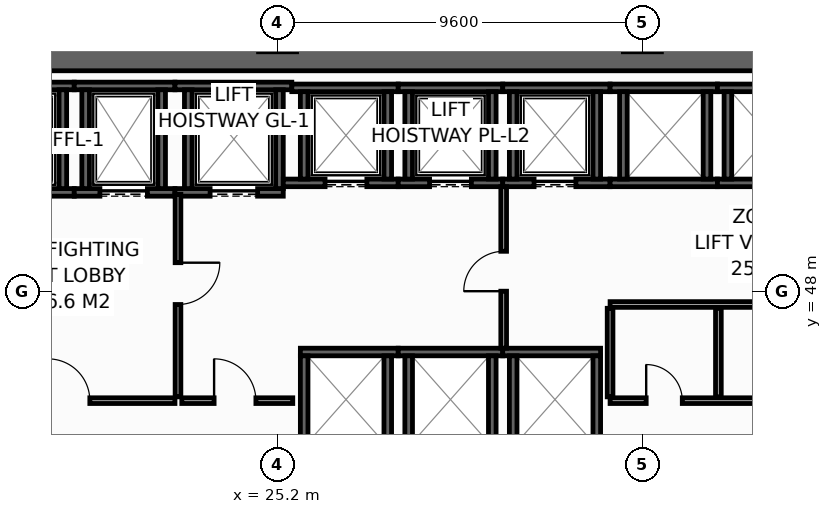
"""IFC4 building model, lengths in metres.
Left out: names, types, materials, properties, quantities, classifications, styles, units other than length and angle.
Written with IfcOpenShell. Run it as: python <this file> out.ifc"""

import sys

from ifc_helpers import new_model, si_unit, direction, frame, frame_2d, origin, place, context, subcontext, project, spatial, rectangle, extrude, element, fill, save


model = new_model("IFC4")
c1 = context("Model", 3, precision=1e-05, world=origin(), true_north=direction((0.0, 1.0)))
c2 = subcontext(c1, "Body", "Model", "MODEL_VIEW")
j1 = project(units=[si_unit("LENGTHUNIT", "METRE"), si_unit("PLANEANGLEUNIT", "RADIAN")], contexts=[c1])
p1 = place(None, origin())
s1 = spatial("IfcSite", under=j1, at=p1, CompositionType="ELEMENT")
p2 = place(p1, origin())
s2 = spatial("IfcBuilding", under=s1, at=p2, CompositionType="ELEMENT")
p3 = place(p2, frame((0.0, 0.0, 106.0)))
s3 = spatial("IfcBuildingStorey", under=s2, at=p3, CompositionType="ELEMENT", Elevation=106.0)
p4 = place(p3, frame((13.5, 54.1, 0.0), z_axis=(0.0, 0.0, 1.0), x_axis=(1.0, 0.0, 0.0)))
e1 = element("IfcWall", 1, at=p4, inside=s3, PredefinedType="SHEAR", context=c2, shape_type="SweptSolid", body=[
    extrude(rectangle(XDim=32.9, YDim=0.6, at=frame_2d((16.45, 0.0))), origin(), (0.0, 0.0, 1.0), 4.15),
])
p5 = place(p3, frame((17.33, 50.6, 0.0), z_axis=(0.0, 0.0, 1.0), x_axis=(1.0, 0.0, 0.0)))
e2 = element("IfcWall", 2, at=p5, inside=s3, PredefinedType="SHEAR", context=c2, shape_type="SweptSolid", body=[
    extrude(rectangle(XDim=2.52, YDim=0.2, at=frame_2d((1.26, 0.0))), origin(), (0.0, 0.0, 1.0), 4.15),
])
p6 = place(p5, frame((0.595, 0.0, 0.0)))
e3 = element("IfcOpeningElement", 3, at=p6, cuts=e2, PredefinedType="OPENING", context=c2, shape_type="SweptSolid", body=[
    extrude(rectangle(XDim=1.25, YDim=2.3, at=frame_2d((0.625, 1.15))), frame((0.0, 0.11, 0.0), z_axis=(0.0, -1.0, 0.0), x_axis=(1.0, 0.0, 0.0)), (0.0, 0.0, 1.0), 0.22),
])
p7 = place(p3, frame((17.33, 53.4, 0.0), z_axis=(0.0, 0.0, 1.0), x_axis=(1.0, 0.0, 0.0)))
e4 = element("IfcWall", 4, at=p7, inside=s3, PredefinedType="SHEAR", context=c2, shape_type="SweptSolid", body=[
    extrude(rectangle(XDim=2.52, YDim=0.2, at=frame_2d((1.26, 0.0))), origin(), (0.0, 0.0, 1.0), 4.15),
])
p8 = place(p3, frame((19.55, 50.7, 0.0), z_axis=(0.0, 0.0, 1.0), x_axis=(0.0, 1.0, 0.0)))
e5 = element("IfcWall", 5, at=p8, inside=s3, PredefinedType="SHEAR", context=c2, shape_type="SweptSolid", body=[
    extrude(rectangle(XDim=2.6, YDim=0.2, at=frame_2d((1.3, 0.0))), origin(), (0.0, 0.0, 1.0), 4.15),
])
p9 = place(p3, frame((19.85, 50.6, 0.0), z_axis=(0.0, 0.0, 1.0), x_axis=(1.0, 0.0, 0.0)))
e6 = element("IfcWall", 6, at=p9, inside=s3, PredefinedType="SHEAR", context=c2, shape_type="SweptSolid", body=[
    extrude(rectangle(XDim=2.65, YDim=0.2, at=frame_2d((1.325, 0.0))), origin(), (0.0, 0.0, 1.0), 4.15),
])
p10 = place(p9, frame((0.675, 0.0, 0.0)))
e7 = element("IfcOpeningElement", 7, at=p10, cuts=e6, PredefinedType="OPENING", context=c2, shape_type="SweptSolid", body=[
    extrude(rectangle(XDim=1.25, YDim=2.3, at=frame_2d((0.625, 1.15))), frame((0.0, 0.11, 0.0), z_axis=(0.0, -1.0, 0.0), x_axis=(1.0, 0.0, 0.0)), (0.0, 0.0, 1.0), 0.22),
])
p11 = place(p3, frame((19.85, 53.4, 0.0), z_axis=(0.0, 0.0, 1.0), x_axis=(1.0, 0.0, 0.0)))
e8 = element("IfcWall", 8, at=p11, inside=s3, PredefinedType="SHEAR", context=c2, shape_type="SweptSolid", body=[
    extrude(rectangle(XDim=2.65, YDim=0.2, at=frame_2d((1.325, 0.0))), origin(), (0.0, 0.0, 1.0), 4.15),
])
for number, where, z_axis, x_axis in (
    (9, (20.15, 50.7, 0.0), (0.0, 0.0, 1.0), (0.0, 1.0, 0.0)),
    (10, (22.15, 50.7, 0.0), (0.0, 0.0, 1.0), (0.0, 1.0, 0.0)),
):
    element("IfcWall", number, at=place(p3, frame(where, z_axis=z_axis, x_axis=x_axis)), inside=s3, PredefinedType="SHEAR", context=c2, shape_type="SweptSolid", body=[
        extrude(rectangle(XDim=2.6, YDim=0.2, at=frame_2d((1.3, 0.0))), origin(), (0.0, 0.0, 1.0), 4.15),
    ])
p12 = place(p3, frame((22.5, 50.6, 0.0), z_axis=(0.0, 0.0, 1.0), x_axis=(1.0, 0.0, 0.0)))
e11 = element("IfcWall", 11, at=p12, inside=s3, PredefinedType="SHEAR", context=c2, shape_type="SweptSolid", body=[
    extrude(rectangle(XDim=2.85, YDim=0.2, at=frame_2d((1.425, 0.0))), origin(), (0.0, 0.0, 1.0), 4.15),
])
p13 = place(p12, frame((0.925, 0.0, 0.0)))
e12 = element("IfcOpeningElement", 12, at=p13, cuts=e11, PredefinedType="OPENING", context=c2, shape_type="SweptSolid", body=[
    extrude(rectangle(XDim=1.25, YDim=2.3, at=frame_2d((0.625, 1.15))), frame((0.0, 0.11, 0.0), z_axis=(0.0, -1.0, 0.0), x_axis=(1.0, 0.0, 0.0)), (0.0, 0.0, 1.0), 0.22),
])
p14 = place(p3, frame((22.5, 53.4, 0.0), z_axis=(0.0, 0.0, 1.0), x_axis=(1.0, 0.0, 0.0)))
e13 = element("IfcWall", 13, at=p14, inside=s3, PredefinedType="SHEAR", context=c2, shape_type="SweptSolid", body=[
    extrude(rectangle(XDim=3.075, YDim=0.2, at=frame_2d((1.538, 0.0))), origin(), (0.0, 0.0, 1.0), 4.15),
])
for number, where, z_axis, x_axis in (
    (14, (22.85, 50.7, 0.0), (0.0, 0.0, 1.0), (0.0, 1.0, 0.0)),
    (15, (25.25, 50.7, 0.0), (0.0, 0.0, 1.0), (0.0, 1.0, 0.0)),
):
    element("IfcWall", number, at=place(p3, frame(where, z_axis=z_axis, x_axis=x_axis)), inside=s3, PredefinedType="SHEAR", context=c2, shape_type="SweptSolid", body=[
        extrude(rectangle(XDim=2.6, YDim=0.2, at=frame_2d((1.3, 0.0))), origin(), (0.0, 0.0, 1.0), 4.15),
    ])
p15 = place(p3, frame((25.35, 50.85, 0.0), z_axis=(0.0, 0.0, 1.0), x_axis=(1.0, 0.0, 0.0)))
e16 = element("IfcWall", 16, at=p15, inside=s3, PredefinedType="SHEAR", context=c2, shape_type="SweptSolid", body=[
    extrude(rectangle(XDim=3.025, YDim=0.2, at=frame_2d((1.512, 0.0))), origin(), (0.0, 0.0, 1.0), 4.15),
])
p16 = place(p15, frame((1.1, 0.0, 0.0)))
e17 = element("IfcOpeningElement", 17, at=p16, cuts=e16, PredefinedType="OPENING", context=c2, shape_type="SweptSolid", body=[
    extrude(rectangle(XDim=1.1, YDim=2.2, at=frame_2d((0.55, 1.1))), frame((0.0, 0.11, 0.0), z_axis=(0.0, -1.0, 0.0), x_axis=(1.0, 0.0, 0.0)), (0.0, 0.0, 1.0), 0.22),
])
p17 = place(p3, frame((25.575, 53.35, 0.0), z_axis=(0.0, 0.0, 1.0), x_axis=(1.0, 0.0, 0.0)))
e18 = element("IfcWall", 18, at=p17, inside=s3, PredefinedType="SHEAR", context=c2, shape_type="SweptSolid", body=[
    extrude(rectangle(XDim=2.8, YDim=0.2, at=frame_2d((1.4, 0.0))), origin(), (0.0, 0.0, 1.0), 4.15),
])
for number, where, z_axis, x_axis in (
    (19, (25.9, 50.95, 0.0), (0.0, 0.0, 1.0), (0.0, 1.0, 0.0)),
    (20, (28.1, 50.95, 0.0), (0.0, 0.0, 1.0), (0.0, 1.0, 0.0)),
):
    element("IfcWall", number, at=place(p3, frame(where, z_axis=z_axis, x_axis=x_axis)), inside=s3, PredefinedType="SHEAR", context=c2, shape_type="SweptSolid", body=[
        extrude(rectangle(XDim=2.3, YDim=0.2, at=frame_2d((1.15, 0.0))), origin(), (0.0, 0.0, 1.0), 4.15),
    ])
p18 = place(p3, frame((28.375, 50.85, 0.0), z_axis=(0.0, 0.0, 1.0), x_axis=(1.0, 0.0, 0.0)))
e21 = element("IfcWall", 21, at=p18, inside=s3, PredefinedType="SHEAR", context=c2, shape_type="SweptSolid", body=[
    extrude(rectangle(XDim=2.75, YDim=0.2, at=frame_2d((1.375, 0.0))), origin(), (0.0, 0.0, 1.0), 4.15),
])
p19 = place(p18, frame((0.825, 0.0, 0.0)))
e22 = element("IfcOpeningElement", 22, at=p19, cuts=e21, PredefinedType="OPENING", context=c2, shape_type="SweptSolid", body=[
    extrude(rectangle(XDim=1.1, YDim=2.2, at=frame_2d((0.55, 1.1))), frame((0.0, 0.11, 0.0), z_axis=(0.0, -1.0, 0.0), x_axis=(1.0, 0.0, 0.0)), (0.0, 0.0, 1.0), 0.22),
])
p20 = place(p3, frame((28.375, 53.35, 0.0), z_axis=(0.0, 0.0, 1.0), x_axis=(1.0, 0.0, 0.0)))
e23 = element("IfcWall", 23, at=p20, inside=s3, PredefinedType="SHEAR", context=c2, shape_type="SweptSolid", body=[
    extrude(rectangle(XDim=2.75, YDim=0.2, at=frame_2d((1.375, 0.0))), origin(), (0.0, 0.0, 1.0), 4.15),
])
for number, where, z_axis, x_axis in (
    (24, (28.65, 50.95, 0.0), (0.0, 0.0, 1.0), (0.0, 1.0, 0.0)),
    (25, (30.85, 50.95, 0.0), (0.0, 0.0, 1.0), (0.0, 1.0, 0.0)),
):
    element("IfcWall", number, at=place(p3, frame(where, z_axis=z_axis, x_axis=x_axis)), inside=s3, PredefinedType="SHEAR", context=c2, shape_type="SweptSolid", body=[
        extrude(rectangle(XDim=2.3, YDim=0.2, at=frame_2d((1.15, 0.0))), origin(), (0.0, 0.0, 1.0), 4.15),
    ])
p21 = place(p3, frame((31.125, 50.85, 0.0), z_axis=(0.0, 0.0, 1.0), x_axis=(1.0, 0.0, 0.0)))
e26 = element("IfcWall", 26, at=p21, inside=s3, PredefinedType="SHEAR", context=c2, shape_type="SweptSolid", body=[
    extrude(rectangle(XDim=2.825, YDim=0.2, at=frame_2d((1.413, 0.0))), origin(), (0.0, 0.0, 1.0), 4.15),
])
p22 = place(p21, frame((0.825, 0.0, 0.0)))
e27 = element("IfcOpeningElement", 27, at=p22, cuts=e26, PredefinedType="OPENING", context=c2, shape_type="SweptSolid", body=[
    extrude(rectangle(XDim=1.1, YDim=2.2, at=frame_2d((0.55, 1.1))), frame((0.0, 0.11, 0.0), z_axis=(0.0, -1.0, 0.0), x_axis=(1.0, 0.0, 0.0)), (0.0, 0.0, 1.0), 0.22),
])
p23 = place(p3, frame((31.125, 53.35, 0.0), z_axis=(0.0, 0.0, 1.0), x_axis=(1.0, 0.0, 0.0)))
e28 = element("IfcWall", 28, at=p23, inside=s3, PredefinedType="SHEAR", context=c2, shape_type="SweptSolid", body=[
    extrude(rectangle(XDim=2.825, YDim=0.2, at=frame_2d((1.413, 0.0))), origin(), (0.0, 0.0, 1.0), 4.15),
])
for number, where, z_axis, x_axis in (
    (29, (31.4, 50.95, 0.0), (0.0, 0.0, 1.0), (0.0, 1.0, 0.0)),
    (30, (33.6, 50.95, 0.0), (0.0, 0.0, 1.0), (0.0, 1.0, 0.0)),
):
    element("IfcWall", number, at=place(p3, frame(where, z_axis=z_axis, x_axis=x_axis)), inside=s3, PredefinedType="SHEAR", context=c2, shape_type="SweptSolid", body=[
        extrude(rectangle(XDim=2.3, YDim=0.2, at=frame_2d((1.15, 0.0))), origin(), (0.0, 0.0, 1.0), 4.15),
    ])
p24 = place(p3, frame((25.8, 46.4, 0.0), z_axis=(0.0, 0.0, 1.0), x_axis=(1.0, 0.0, 0.0)))
e31 = element("IfcWall", 31, at=p24, inside=s3, PredefinedType="SHEAR", context=c2, shape_type="SweptSolid", body=[
    extrude(rectangle(XDim=2.575, YDim=0.2, at=frame_2d((1.288, 0.0))), origin(), (0.0, 0.0, 1.0), 4.15),
])
for number, where, z_axis, x_axis in (
    (32, (25.9, 44.0, 0.0), (0.0, 0.0, 1.0), (0.0, 1.0, 0.0)),
    (33, (28.1, 44.0, 0.0), (0.0, 0.0, 1.0), (0.0, 1.0, 0.0)),
):
    element("IfcWall", number, at=place(p3, frame(where, z_axis=z_axis, x_axis=x_axis)), inside=s3, PredefinedType="SHEAR", context=c2, shape_type="SweptSolid", body=[
        extrude(rectangle(XDim=2.3, YDim=0.2, at=frame_2d((1.15, 0.0))), origin(), (0.0, 0.0, 1.0), 4.15),
    ])
p25 = place(p3, frame((28.375, 46.4, 0.0), z_axis=(0.0, 0.0, 1.0), x_axis=(1.0, 0.0, 0.0)))
e34 = element("IfcWall", 34, at=p25, inside=s3, PredefinedType="SHEAR", context=c2, shape_type="SweptSolid", body=[
    extrude(rectangle(XDim=2.75, YDim=0.2, at=frame_2d((1.375, 0.0))), origin(), (0.0, 0.0, 1.0), 4.15),
])
for number, where, z_axis, x_axis in (
    (35, (28.65, 44.0, 0.0), (0.0, 0.0, 1.0), (0.0, 1.0, 0.0)),
    (36, (30.85, 44.0, 0.0), (0.0, 0.0, 1.0), (0.0, 1.0, 0.0)),
):
    element("IfcWall", number, at=place(p3, frame(where, z_axis=z_axis, x_axis=x_axis)), inside=s3, PredefinedType="SHEAR", context=c2, shape_type="SweptSolid", body=[
        extrude(rectangle(XDim=2.3, YDim=0.2, at=frame_2d((1.15, 0.0))), origin(), (0.0, 0.0, 1.0), 4.15),
    ])
p26 = place(p3, frame((31.125, 46.4, 0.0), z_axis=(0.0, 0.0, 1.0), x_axis=(1.0, 0.0, 0.0)))
e37 = element("IfcWall", 37, at=p26, inside=s3, PredefinedType="SHEAR", context=c2, shape_type="SweptSolid", body=[
    extrude(rectangle(XDim=2.575, YDim=0.2, at=frame_2d((1.288, 0.0))), origin(), (0.0, 0.0, 1.0), 4.15),
])
for number, where, z_axis, x_axis in (
    (38, (31.4, 44.0, 0.0), (0.0, 0.0, 1.0), (0.0, 1.0, 0.0)),
    (39, (33.6, 44.0, 0.0), (0.0, 0.0, 1.0), (0.0, 1.0, 0.0)),
):
    element("IfcWall", number, at=place(p3, frame(where, z_axis=z_axis, x_axis=x_axis)), inside=s3, PredefinedType="SHEAR", context=c2, shape_type="SweptSolid", body=[
        extrude(rectangle(XDim=2.3, YDim=0.2, at=frame_2d((1.15, 0.0))), origin(), (0.0, 0.0, 1.0), 4.15),
    ])
for number, where, z_axis, x_axis in (
    (40, (33.95, 50.85, 0.0), (0.0, 0.0, 1.0), (1.0, 0.0, 0.0)),
    (41, (33.95, 53.35, 0.0), (0.0, 0.0, 1.0), (1.0, 0.0, 0.0)),
):
    element("IfcWall", number, at=place(p3, frame(where, z_axis=z_axis, x_axis=x_axis)), inside=s3, PredefinedType="SHEAR", context=c2, shape_type="SweptSolid", body=[
        extrude(rectangle(XDim=2.825, YDim=0.2, at=frame_2d((1.413, 0.0))), origin(), (0.0, 0.0, 1.0), 4.15),
    ])
for number, where, z_axis, x_axis in (
    (42, (34.3, 50.95, 0.0), (0.0, 0.0, 1.0), (0.0, 1.0, 0.0)),
    (43, (36.5, 50.95, 0.0), (0.0, 0.0, 1.0), (0.0, 1.0, 0.0)),
):
    element("IfcWall", number, at=place(p3, frame(where, z_axis=z_axis, x_axis=x_axis)), inside=s3, PredefinedType="SHEAR", context=c2, shape_type="SweptSolid", body=[
        extrude(rectangle(XDim=2.3, YDim=0.2, at=frame_2d((1.15, 0.0))), origin(), (0.0, 0.0, 1.0), 4.15),
    ])
for number, where, z_axis, x_axis in (
    (44, (36.775, 50.85, 0.0), (0.0, 0.0, 1.0), (1.0, 0.0, 0.0)),
    (45, (36.775, 53.35, 0.0), (0.0, 0.0, 1.0), (1.0, 0.0, 0.0)),
):
    element("IfcWall", number, at=place(p3, frame(where, z_axis=z_axis, x_axis=x_axis)), inside=s3, PredefinedType="SHEAR", context=c2, shape_type="SweptSolid", body=[
        extrude(rectangle(XDim=2.75, YDim=0.2, at=frame_2d((1.375, 0.0))), origin(), (0.0, 0.0, 1.0), 4.15),
    ])
p27 = place(p3, frame((37.05, 50.95, 0.0), z_axis=(0.0, 0.0, 1.0), x_axis=(0.0, 1.0, 0.0)))
e46 = element("IfcWall", 46, at=p27, inside=s3, PredefinedType="SHEAR", context=c2, shape_type="SweptSolid", body=[
    extrude(rectangle(XDim=2.3, YDim=0.2, at=frame_2d((1.15, 0.0))), origin(), (0.0, 0.0, 1.0), 4.15),
])
p28 = place(p3, frame((17.36, 45.12, 0.0), z_axis=(0.0, 0.0, 1.0), x_axis=(1.0, 0.0, 0.0)))
e47 = element("IfcWall", 47, at=p28, inside=s3, PredefinedType="PARTITIONING", context=c2, shape_type="SweptSolid", body=[
    extrude(rectangle(XDim=5.14, YDim=0.15, at=frame_2d((2.57, 0.0))), origin(), (0.0, 0.0, 1.0), 4.15),
])
p29 = place(p28, frame((1.8, 0.0, 0.0)))
e48 = element("IfcOpeningElement", 48, at=p29, cuts=e47, PredefinedType="OPENING", context=c2, shape_type="SweptSolid", body=[
    extrude(rectangle(XDim=1.1, YDim=2.15, at=frame_2d((0.55, 1.075))), frame((0.0, 0.085, 0.0), z_axis=(0.0, -1.0, 0.0), x_axis=(1.0, 0.0, 0.0)), (0.0, 0.0, 1.0), 0.17),
])
p30 = place(p3, frame((22.58, 50.55, 0.0), z_axis=(0.0, 0.0, 1.0), x_axis=(0.0, -1.0, 0.0)))
e49 = element("IfcWall", 49, at=p30, inside=s3, PredefinedType="PARTITIONING", context=c2, shape_type="SweptSolid", body=[
    extrude(rectangle(XDim=5.33, YDim=0.15, at=frame_2d((2.665, 0.0))), origin(), (0.0, 0.0, 1.0), 4.15),
])
p31 = place(p30, frame((1.8, 0.0, 0.0)))
e50 = element("IfcOpeningElement", 50, at=p31, cuts=e49, PredefinedType="OPENING", context=c2, shape_type="SweptSolid", body=[
    extrude(rectangle(XDim=1.1, YDim=2.15, at=frame_2d((0.55, 1.075))), frame((0.0, 0.085, 0.0), z_axis=(0.0, -1.0, 0.0), x_axis=(1.0, 0.0, 0.0)), (0.0, 0.0, 1.0), 0.17),
])
p32 = place(p3, frame((22.68, 45.12, 0.0), z_axis=(0.0, 0.0, 1.0), x_axis=(1.0, 0.0, 0.0)))
e51 = element("IfcWall", 51, at=p32, inside=s3, PredefinedType="PARTITIONING", context=c2, shape_type="SweptSolid", body=[
    extrude(rectangle(XDim=2.92, YDim=0.15, at=frame_2d((1.46, 0.0))), origin(), (0.0, 0.0, 1.0), 4.15),
])
p33 = place(p32, frame((0.85, 0.0, 0.0)))
e52 = element("IfcOpeningElement", 52, at=p33, cuts=e51, PredefinedType="OPENING", context=c2, shape_type="SweptSolid", body=[
    extrude(rectangle(XDim=1.1, YDim=2.15, at=frame_2d((0.55, 1.075))), frame((0.0, 0.085, 0.0), z_axis=(0.0, -1.0, 0.0), x_axis=(1.0, 0.0, 0.0)), (0.0, 0.0, 1.0), 0.17),
])
p34 = place(p3, frame((31.15, 46.5, 0.0), z_axis=(0.0, 0.0, 1.0), x_axis=(0.0, 1.0, 0.0)))
e53 = element("IfcWall", 53, at=p34, inside=s3, PredefinedType="PARTITIONING", context=c2, shape_type="SweptSolid", body=[
    extrude(rectangle(XDim=4.25, YDim=0.15, at=frame_2d((2.125, 0.0))), origin(), (0.0, 0.0, 1.0), 4.15),
])
p35 = place(p34, frame((1.5, 0.0, 0.0)))
e54 = element("IfcOpeningElement", 54, at=p35, cuts=e53, PredefinedType="OPENING", context=c2, shape_type="SweptSolid", body=[
    extrude(rectangle(XDim=1.05, YDim=2.15, at=frame_2d((0.525, 1.075))), frame((0.0, 0.085, 0.0), z_axis=(0.0, -1.0, 0.0), x_axis=(1.0, 0.0, 0.0)), (0.0, 0.0, 1.0), 0.17),
])
p36 = place(p3, frame((33.95, 45.12, 0.0), z_axis=(0.0, 0.0, 1.0), x_axis=(1.0, 0.0, 0.0)))
e55 = element("IfcWall", 55, at=p36, inside=s3, PredefinedType="PARTITIONING", context=c2, shape_type="SweptSolid", body=[
    extrude(rectangle(XDim=8.55, YDim=0.15, at=frame_2d((4.275, 0.0))), origin(), (0.0, 0.0, 1.0), 4.15),
])
p37 = place(p36, frame((0.95, 0.0, 0.0)))
e56 = element("IfcOpeningElement", 56, at=p37, cuts=e55, PredefinedType="OPENING", context=c2, shape_type="SweptSolid", body=[
    extrude(rectangle(XDim=0.95, YDim=2.15, at=frame_2d((0.475, 1.075))), frame((0.0, 0.085, 0.0), z_axis=(0.0, -1.0, 0.0), x_axis=(1.0, 0.0, 0.0)), (0.0, 0.0, 1.0), 0.17),
])
p38 = place(p36, frame((3.8, 0.0, 0.0)))
e57 = element("IfcOpeningElement", 57, at=p38, cuts=e55, PredefinedType="OPENING", context=c2, shape_type="SweptSolid", body=[
    extrude(rectangle(XDim=0.95, YDim=2.15, at=frame_2d((0.475, 1.075))), frame((0.0, 0.085, 0.0), z_axis=(0.0, -1.0, 0.0), x_axis=(1.0, 0.0, 0.0)), (0.0, 0.0, 1.0), 0.17),
])
p39 = place(p36, frame((6.65, 0.0, 0.0)))
e58 = element("IfcOpeningElement", 58, at=p39, cuts=e55, PredefinedType="OPENING", context=c2, shape_type="SweptSolid", body=[
    extrude(rectangle(XDim=0.95, YDim=2.15, at=frame_2d((0.475, 1.075))), frame((0.0, 0.085, 0.0), z_axis=(0.0, -1.0, 0.0), x_axis=(1.0, 0.0, 0.0)), (0.0, 0.0, 1.0), 0.17),
])
p40 = place(p3, frame((33.95, 47.65, 0.0), z_axis=(0.0, 0.0, 1.0), x_axis=(1.0, 0.0, 0.0)))
e59 = element("IfcWall", 59, at=p40, inside=s3, PredefinedType="PARTITIONING", context=c2, shape_type="SweptSolid", body=[
    extrude(rectangle(XDim=8.55, YDim=0.15, at=frame_2d((4.275, 0.0))), origin(), (0.0, 0.0, 1.0), 4.15),
])
for number, where, z_axis, x_axis in (
    (60, (33.95, 45.22, 0.0), (0.0, 0.0, 1.0), (0.0, 1.0, 0.0)),
    (61, (36.8, 45.22, 0.0), (0.0, 0.0, 1.0), (0.0, 1.0, 0.0)),
):
    element("IfcWall", number, at=place(p3, frame(where, z_axis=z_axis, x_axis=x_axis)), inside=s3, PredefinedType="PARTITIONING", context=c2, shape_type="SweptSolid", body=[
        extrude(rectangle(XDim=2.33, YDim=0.15, at=frame_2d((1.165, 0.0))), origin(), (0.0, 0.0, 1.0), 4.15),
    ])
p41 = place(p10, origin())
e62 = element("IfcDoor", 62, at=p41, inside=s3, OperationType="SLIDING_TO_LEFT", PredefinedType="DOOR", context=c2, shape_type="SweptSolid", body=[
    extrude(rectangle(XDim=1.25, YDim=2.3, at=frame_2d((0.625, 1.15))), frame((0.0, 0.025, 0.0), z_axis=(0.0, -1.0, 0.0), x_axis=(1.0, 0.0, 0.0)), (0.0, 0.0, 1.0), 0.05),
])
fill(e7, e62)
p42 = place(p13, origin())
e63 = element("IfcDoor", 63, at=p42, inside=s3, OperationType="SLIDING_TO_LEFT", PredefinedType="DOOR", context=c2, shape_type="SweptSolid", body=[
    extrude(rectangle(XDim=1.25, YDim=2.3, at=frame_2d((0.625, 1.15))), frame((0.0, 0.025, 0.0), z_axis=(0.0, -1.0, 0.0), x_axis=(1.0, 0.0, 0.0)), (0.0, 0.0, 1.0), 0.05),
])
fill(e12, e63)
p43 = place(p16, origin())
e64 = element("IfcDoor", 64, at=p43, inside=s3, OperationType="SLIDING_TO_LEFT", PredefinedType="DOOR", context=c2, shape_type="SweptSolid", body=[
    extrude(rectangle(XDim=1.1, YDim=2.2, at=frame_2d((0.55, 1.1))), frame((0.0, 0.025, 0.0), z_axis=(0.0, -1.0, 0.0), x_axis=(1.0, 0.0, 0.0)), (0.0, 0.0, 1.0), 0.05),
])
fill(e17, e64)
p44 = place(p19, origin())
e65 = element("IfcDoor", 65, at=p44, inside=s3, OperationType="SLIDING_TO_LEFT", PredefinedType="DOOR", context=c2, shape_type="SweptSolid", body=[
    extrude(rectangle(XDim=1.1, YDim=2.2, at=frame_2d((0.55, 1.1))), frame((0.0, 0.025, 0.0), z_axis=(0.0, -1.0, 0.0), x_axis=(1.0, 0.0, 0.0)), (0.0, 0.0, 1.0), 0.05),
])
fill(e22, e65)
p45 = place(p22, origin())
e66 = element("IfcDoor", 66, at=p45, inside=s3, OperationType="SLIDING_TO_LEFT", PredefinedType="DOOR", context=c2, shape_type="SweptSolid", body=[
    extrude(rectangle(XDim=1.1, YDim=2.2, at=frame_2d((0.55, 1.1))), frame((0.0, 0.025, 0.0), z_axis=(0.0, -1.0, 0.0), x_axis=(1.0, 0.0, 0.0)), (0.0, 0.0, 1.0), 0.05),
])
fill(e27, e66)
p46 = place(p29, origin())
e67 = element("IfcDoor", 67, at=p46, inside=s3, OperationType="SINGLE_SWING_LEFT", PredefinedType="DOOR", context=c2, shape_type="SweptSolid", body=[
    extrude(rectangle(XDim=1.1, YDim=2.15, at=frame_2d((0.55, 1.075))), frame((0.0, 0.025, 0.0), z_axis=(0.0, -1.0, 0.0), x_axis=(1.0, 0.0, 0.0)), (0.0, 0.0, 1.0), 0.05),
])
fill(e48, e67)
p47 = place(p31, origin())
e68 = element("IfcDoor", 68, at=p47, inside=s3, OperationType="SINGLE_SWING_LEFT", PredefinedType="DOOR", context=c2, shape_type="SweptSolid", body=[
    extrude(rectangle(XDim=1.1, YDim=2.15, at=frame_2d((0.55, 1.075))), frame((0.0, 0.025, 0.0), z_axis=(0.0, -1.0, 0.0), x_axis=(1.0, 0.0, 0.0)), (0.0, 0.0, 1.0), 0.05),
])
fill(e50, e68)
p48 = place(p33, origin())
e69 = element("IfcDoor", 69, at=p48, inside=s3, OperationType="SINGLE_SWING_LEFT", PredefinedType="DOOR", context=c2, shape_type="SweptSolid", body=[
    extrude(rectangle(XDim=1.1, YDim=2.15, at=frame_2d((0.55, 1.075))), frame((0.0, 0.025, 0.0), z_axis=(0.0, -1.0, 0.0), x_axis=(1.0, 0.0, 0.0)), (0.0, 0.0, 1.0), 0.05),
])
fill(e52, e69)
p49 = place(p35, origin())
e70 = element("IfcDoor", 70, at=p49, inside=s3, OperationType="SINGLE_SWING_LEFT", PredefinedType="DOOR", context=c2, shape_type="SweptSolid", body=[
    extrude(rectangle(XDim=1.05, YDim=2.15, at=frame_2d((0.525, 1.075))), frame((0.0, 0.025, 0.0), z_axis=(0.0, -1.0, 0.0), x_axis=(1.0, 0.0, 0.0)), (0.0, 0.0, 1.0), 0.05),
])
fill(e54, e70)
p50 = place(p37, origin())
e71 = element("IfcDoor", 71, at=p50, inside=s3, OperationType="SINGLE_SWING_LEFT", PredefinedType="DOOR", context=c2, shape_type="SweptSolid", body=[
    extrude(rectangle(XDim=0.95, YDim=2.15, at=frame_2d((0.475, 1.075))), frame((0.0, 0.025, 0.0), z_axis=(0.0, -1.0, 0.0), x_axis=(1.0, 0.0, 0.0)), (0.0, 0.0, 1.0), 0.05),
])
fill(e56, e71)
save(model, sys.argv[1])
